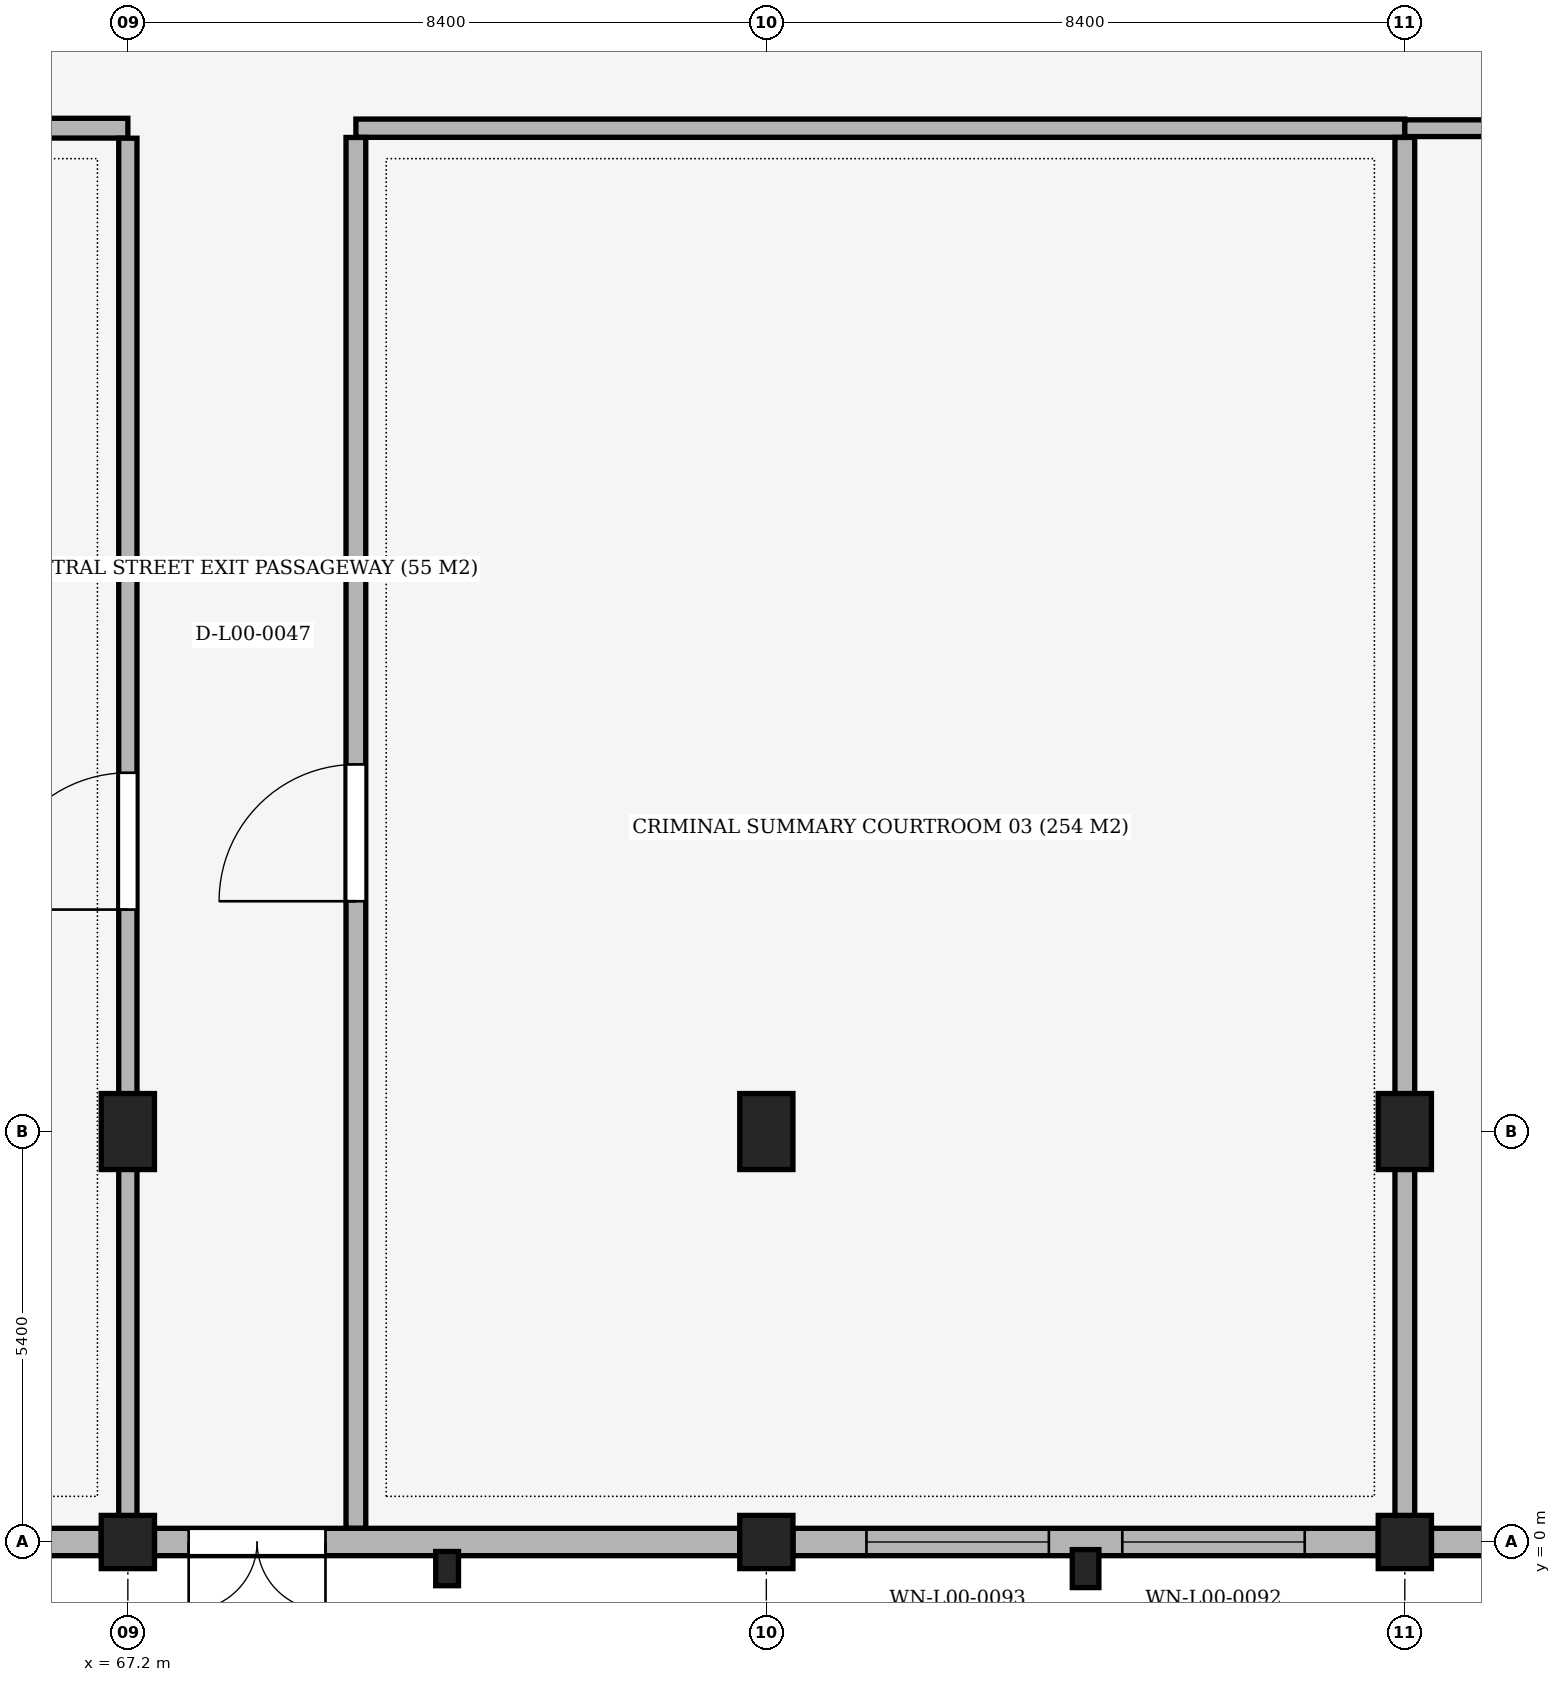
"""IFC4 building model, lengths in metres.
Left out: names, types, materials, properties, quantities, classifications, styles, units other than length and angle.
Written with IfcOpenShell. Run it as: python <this file> out.ifc"""

import sys

from ifc_helpers import new_model, si_unit, direction, frame, frame_2d, origin, origin_2d, place, context, subcontext, project, spatial, rectangle, extrude, element, fill, save


model = new_model("IFC4")
c1 = context("Model", 3, precision=1e-05, world=origin(), true_north=direction((0.0, 1.0)))
c2 = subcontext(c1, "Body", "Model", "MODEL_VIEW")
j1 = project(units=[si_unit("LENGTHUNIT", "METRE"), si_unit("PLANEANGLEUNIT", "RADIAN")], contexts=[c1])
p1 = place(None, origin())
s1 = spatial("IfcSite", under=j1, at=p1, CompositionType="ELEMENT")
p2 = place(p1, origin())
s2 = spatial("IfcBuilding", under=s1, at=p2, CompositionType="ELEMENT")
p3 = place(p2, origin())
s3 = spatial("IfcBuildingStorey", under=s2, at=p3, CompositionType="ELEMENT", Elevation=0.0)
p4 = place(p3, frame((67.2, 0.0, 0.0), z_axis=(0.0, 0.0, 1.0), x_axis=(1.0, 0.0, 0.0)))
e1 = element("IfcColumn", 1, at=p4, inside=s3, PredefinedType="COLUMN", context=c2, shape_type="SweptSolid", body=[
    extrude(rectangle(XDim=0.7, YDim=0.7, at=origin_2d()), origin(), (0.0, 0.0, 1.0), 5.1),
])
p5 = place(p3, frame((67.2, 5.4, 0.0), z_axis=(0.0, 0.0, 1.0), x_axis=(1.0, 0.0, 0.0)))
e2 = element("IfcColumn", 2, at=p5, inside=s3, PredefinedType="COLUMN", context=c2, shape_type="SweptSolid", body=[
    extrude(rectangle(XDim=0.7, YDim=1.0, at=origin_2d()), origin(), (0.0, 0.0, 1.0), 5.1),
])
p6 = place(p3, frame((75.6, 0.0, 0.0), z_axis=(0.0, 0.0, 1.0), x_axis=(1.0, 0.0, 0.0)))
e3 = element("IfcColumn", 3, at=p6, inside=s3, PredefinedType="COLUMN", context=c2, shape_type="SweptSolid", body=[
    extrude(rectangle(XDim=0.7, YDim=0.7, at=origin_2d()), origin(), (0.0, 0.0, 1.0), 5.1),
])
p7 = place(p3, frame((75.6, 5.4, 0.0), z_axis=(0.0, 0.0, 1.0), x_axis=(1.0, 0.0, 0.0)))
e4 = element("IfcColumn", 4, at=p7, inside=s3, PredefinedType="COLUMN", context=c2, shape_type="SweptSolid", body=[
    extrude(rectangle(XDim=0.7, YDim=1.0, at=origin_2d()), origin(), (0.0, 0.0, 1.0), 5.1),
])
p8 = place(p3, frame((84.0, 0.0, 0.0), z_axis=(0.0, 0.0, 1.0), x_axis=(1.0, 0.0, 0.0)))
e5 = element("IfcColumn", 5, at=p8, inside=s3, PredefinedType="COLUMN", context=c2, shape_type="SweptSolid", body=[
    extrude(rectangle(XDim=0.7, YDim=0.7, at=origin_2d()), origin(), (0.0, 0.0, 1.0), 5.1),
])
p9 = place(p3, frame((84.0, 5.4, 0.0), z_axis=(0.0, 0.0, 1.0), x_axis=(1.0, 0.0, 0.0)))
e6 = element("IfcColumn", 6, at=p9, inside=s3, PredefinedType="COLUMN", context=c2, shape_type="SweptSolid", body=[
    extrude(rectangle(XDim=0.7, YDim=1.0, at=origin_2d()), origin(), (0.0, 0.0, 1.0), 5.1),
])
p10 = place(p3, frame((71.4, -0.35, 0.0), z_axis=(0.0, 0.0, 1.0), x_axis=(1.0, 0.0, 0.0)))
e7 = element("IfcColumn", 7, at=p10, inside=s3, PredefinedType="PILASTER", context=c2, shape_type="SweptSolid", body=[
    extrude(rectangle(XDim=0.3, YDim=0.45, at=origin_2d()), origin(), (0.0, 0.0, 1.0), 5.1),
])
p11 = place(p3, frame((79.8, -0.35, 0.0), z_axis=(0.0, 0.0, 1.0), x_axis=(1.0, 0.0, 0.0)))
e8 = element("IfcColumn", 8, at=p11, inside=s3, PredefinedType="PILASTER", context=c2, shape_type="SweptSolid", body=[
    extrude(rectangle(XDim=0.35, YDim=0.5, at=origin_2d()), origin(), (0.0, 0.0, 1.0), 5.1),
])
p12 = place(p3, frame((92.05, 0.0, 0.0), z_axis=(0.0, 0.0, 1.0), x_axis=(-1.0, 0.0, 0.0)))
e9 = element("IfcWall", 9, at=p12, inside=s3, PredefinedType="SOLIDWALL", context=c2, shape_type="SweptSolid", body=[
    extrude(rectangle(XDim=7.7, YDim=0.36, at=frame_2d((3.85, 0.0))), origin(), (0.0, 0.0, 1.0), 4.07),
])
p13 = place(p12, frame((0.967, 0.0, 0.85)))
e10 = element("IfcOpeningElement", 10, at=p13, cuts=e9, PredefinedType="OPENING", context=c2, shape_type="SweptSolid", body=[
    extrude(rectangle(XDim=2.4, YDim=2.4, at=frame_2d((1.2, 1.2))), frame((0.0, 0.195, 0.0), z_axis=(0.0, -1.0, 0.0), x_axis=(1.0, 0.0, 0.0)), (0.0, 0.0, 1.0), 0.39),
])
p14 = place(p12, frame((4.333, 0.0, 0.85)))
e11 = element("IfcOpeningElement", 11, at=p14, cuts=e9, PredefinedType="OPENING", context=c2, shape_type="SweptSolid", body=[
    extrude(rectangle(XDim=2.4, YDim=2.4, at=frame_2d((1.2, 1.2))), frame((0.0, 0.195, 0.0), z_axis=(0.0, -1.0, 0.0), x_axis=(1.0, 0.0, 0.0)), (0.0, 0.0, 1.0), 0.39),
])
p15 = place(p3, frame((83.65, 0.0, 0.0), z_axis=(0.0, 0.0, 1.0), x_axis=(-1.0, 0.0, 0.0)))
e12 = element("IfcWall", 12, at=p15, inside=s3, PredefinedType="SOLIDWALL", context=c2, shape_type="SweptSolid", body=[
    extrude(rectangle(XDim=7.7, YDim=0.36, at=frame_2d((3.85, 0.0))), origin(), (0.0, 0.0, 1.0), 4.07),
])
p16 = place(p15, frame((0.967, 0.0, 0.85)))
e13 = element("IfcOpeningElement", 13, at=p16, cuts=e12, PredefinedType="OPENING", context=c2, shape_type="SweptSolid", body=[
    extrude(rectangle(XDim=2.4, YDim=2.4, at=frame_2d((1.2, 1.2))), frame((0.0, 0.195, 0.0), z_axis=(0.0, -1.0, 0.0), x_axis=(1.0, 0.0, 0.0)), (0.0, 0.0, 1.0), 0.39),
])
p17 = place(p15, frame((4.333, 0.0, 0.85)))
e14 = element("IfcOpeningElement", 14, at=p17, cuts=e12, PredefinedType="OPENING", context=c2, shape_type="SweptSolid", body=[
    extrude(rectangle(XDim=2.4, YDim=2.4, at=frame_2d((1.2, 1.2))), frame((0.0, 0.195, 0.0), z_axis=(0.0, -1.0, 0.0), x_axis=(1.0, 0.0, 0.0)), (0.0, 0.0, 1.0), 0.39),
])
p18 = place(p3, frame((75.25, 0.0, 0.0), z_axis=(0.0, 0.0, 1.0), x_axis=(-1.0, 0.0, 0.0)))
e15 = element("IfcWall", 15, at=p18, inside=s3, PredefinedType="SOLIDWALL", context=c2, shape_type="SweptSolid", body=[
    extrude(rectangle(XDim=7.7, YDim=0.36, at=frame_2d((3.85, 0.0))), origin(), (0.0, 0.0, 1.0), 4.07),
])
p19 = place(p18, frame((5.45, 0.0, 0.0)))
e16 = element("IfcOpeningElement", 16, at=p19, cuts=e15, PredefinedType="OPENING", context=c2, shape_type="SweptSolid", body=[
    extrude(rectangle(XDim=1.8, YDim=2.2, at=frame_2d((0.9, 1.1))), frame((0.0, 0.195, 0.0), z_axis=(0.0, -1.0, 0.0), x_axis=(1.0, 0.0, 0.0)), (0.0, 0.0, 1.0), 0.39),
])
p20 = place(p3, frame((66.85, 0.0, 0.0), z_axis=(0.0, 0.0, 1.0), x_axis=(-1.0, 0.0, 0.0)))
e17 = element("IfcWall", 17, at=p20, inside=s3, PredefinedType="SOLIDWALL", context=c2, shape_type="SweptSolid", body=[
    extrude(rectangle(XDim=7.7, YDim=0.36, at=frame_2d((3.85, 0.0))), origin(), (0.0, 0.0, 1.0), 4.07),
])
p21 = place(p20, frame((3.25, 0.0, 0.0)))
e18 = element("IfcOpeningElement", 18, at=p21, cuts=e17, PredefinedType="OPENING", context=c2, shape_type="SweptSolid", body=[
    extrude(rectangle(XDim=1.2, YDim=2.2, at=frame_2d((0.6, 1.1))), frame((0.0, 0.195, 0.0), z_axis=(0.0, -1.0, 0.0), x_axis=(1.0, 0.0, 0.0)), (0.0, 0.0, 1.0), 0.39),
])
p22 = place(p3, frame((50.4, 18.6, 0.0), z_axis=(0.0, 0.0, 1.0), x_axis=(1.0, 0.0, 0.0)))
e19 = element("IfcWall", 19, at=p22, inside=s3, PredefinedType="PARTITIONING", context=c2, shape_type="SweptSolid", body=[
    extrude(rectangle(XDim=16.8, YDim=0.26, at=frame_2d((8.4, 0.0))), origin(), (0.0, 0.0, 1.0), 3.67),
])
p23 = place(p3, frame((70.2, 18.6, 0.0), z_axis=(0.0, 0.0, 1.0), x_axis=(1.0, 0.0, 0.0)))
e20 = element("IfcWall", 20, at=p23, inside=s3, PredefinedType="PARTITIONING", context=c2, shape_type="SweptSolid", body=[
    extrude(rectangle(XDim=13.8, YDim=0.24, at=frame_2d((6.9, 0.0))), origin(), (0.0, 0.0, 1.0), 3.67),
])
p24 = place(p3, frame((84.0, 18.6, 0.0), z_axis=(0.0, 0.0, 1.0), x_axis=(1.0, 0.0, 0.0)))
e21 = element("IfcWall", 21, at=p24, inside=s3, PredefinedType="PARTITIONING", context=c2, shape_type="SweptSolid", body=[
    extrude(rectangle(XDim=24.8, YDim=0.22, at=frame_2d((12.4, 0.0))), origin(), (0.0, 0.0, 1.0), 3.67),
])
p25 = place(p24, frame((11.9, 0.0, 0.0)))
e22 = element("IfcOpeningElement", 22, at=p25, cuts=e21, PredefinedType="OPENING", context=c2, shape_type="SweptSolid", body=[
    extrude(rectangle(XDim=1.0, YDim=2.2, at=frame_2d((0.5, 1.1))), frame((0.0, 0.125, 0.0), z_axis=(0.0, -1.0, 0.0), x_axis=(1.0, 0.0, 0.0)), (0.0, 0.0, 1.0), 0.25),
])
p26 = place(p3, frame((67.2, -0.028, 0.0), z_axis=(0.0, 0.0, 1.0), x_axis=(0.0, 1.0, 0.0)))
e23 = element("IfcWall", 23, at=p26, inside=s3, PredefinedType="PARTITIONING", context=c2, shape_type="SweptSolid", body=[
    extrude(rectangle(XDim=18.496, YDim=0.24, at=frame_2d((9.248, 0.0))), origin(), (0.0, 0.0, 1.0), 3.67),
])
p27 = place(p26, frame((8.348, 0.0, 0.0)))
e24 = element("IfcOpeningElement", 24, at=p27, cuts=e23, PredefinedType="OPENING", context=c2, shape_type="SweptSolid", body=[
    extrude(rectangle(XDim=1.8, YDim=2.4, at=frame_2d((0.9, 1.2))), frame((0.0, 0.135, 0.0), z_axis=(0.0, -1.0, 0.0), x_axis=(1.0, 0.0, 0.0)), (0.0, 0.0, 1.0), 0.27),
])
p28 = place(p3, frame((70.2, 0.182, 0.0), z_axis=(0.0, 0.0, 1.0), x_axis=(0.0, 1.0, 0.0)))
e25 = element("IfcWall", 25, at=p28, inside=s3, PredefinedType="PARTITIONING", context=c2, shape_type="SweptSolid", body=[
    extrude(rectangle(XDim=18.296, YDim=0.26, at=frame_2d((9.148, 0.0))), origin(), (0.0, 0.0, 1.0), 4.07),
])
p29 = place(p28, frame((8.248, 0.0, 0.0)))
e26 = element("IfcOpeningElement", 26, at=p29, cuts=e25, PredefinedType="OPENING", context=c2, shape_type="SweptSolid", body=[
    extrude(rectangle(XDim=1.8, YDim=2.4, at=frame_2d((0.9, 1.2))), frame((0.0, 0.145, 0.0), z_axis=(0.0, -1.0, 0.0), x_axis=(1.0, 0.0, 0.0)), (0.0, 0.0, 1.0), 0.29),
])
p30 = place(p3, frame((84.0, -0.028, 0.0), z_axis=(0.0, 0.0, 1.0), x_axis=(0.0, 1.0, 0.0)))
e27 = element("IfcWall", 27, at=p30, inside=s3, PredefinedType="PARTITIONING", context=c2, shape_type="SweptSolid", body=[
    extrude(rectangle(XDim=18.506, YDim=0.26, at=frame_2d((9.253, 0.0))), origin(), (0.0, 0.0, 1.0), 3.67),
])
p31 = place(p16, origin())
e28 = element("IfcWindow", 28, at=p31, inside=s3, PartitioningType="SINGLE_PANEL", PredefinedType="WINDOW", context=c2, shape_type="SweptSolid", body=[
    extrude(rectangle(XDim=2.4, YDim=2.4, at=frame_2d((1.2, 1.2))), frame((0.0, 0.03, 0.0), z_axis=(0.0, -1.0, 0.0), x_axis=(1.0, 0.0, 0.0)), (0.0, 0.0, 1.0), 0.06),
])
fill(e13, e28)
p32 = place(p17, origin())
e29 = element("IfcWindow", 29, at=p32, inside=s3, PartitioningType="SINGLE_PANEL", PredefinedType="WINDOW", context=c2, shape_type="SweptSolid", body=[
    extrude(rectangle(XDim=2.4, YDim=2.4, at=frame_2d((1.2, 1.2))), frame((0.0, 0.03, 0.0), z_axis=(0.0, -1.0, 0.0), x_axis=(1.0, 0.0, 0.0)), (0.0, 0.0, 1.0), 0.06),
])
fill(e14, e29)
p33 = place(p19, origin())
e30 = element("IfcDoor", 30, at=p33, inside=s3, OperationType="DOUBLE_DOOR_SINGLE_SWING", PredefinedType="DOOR", context=c2, shape_type="SweptSolid", body=[
    extrude(rectangle(XDim=1.8, YDim=2.2, at=frame_2d((0.9, 1.1))), frame((0.0, 0.025, 0.0), z_axis=(0.0, -1.0, 0.0), x_axis=(1.0, 0.0, 0.0)), (0.0, 0.0, 1.0), 0.05),
])
fill(e16, e30)
p34 = place(p27, origin())
e31 = element("IfcDoor", 31, at=p34, inside=s3, OperationType="SINGLE_SWING_LEFT", PredefinedType="DOOR", context=c2, shape_type="SweptSolid", body=[
    extrude(rectangle(XDim=1.8, YDim=2.4, at=frame_2d((0.9, 1.2))), frame((0.0, 0.025, 0.0), z_axis=(0.0, -1.0, 0.0), x_axis=(1.0, 0.0, 0.0)), (0.0, 0.0, 1.0), 0.05),
])
fill(e24, e31)
p35 = place(p29, origin())
e32 = element("IfcDoor", 32, at=p35, inside=s3, OperationType="SINGLE_SWING_LEFT", PredefinedType="DOOR", context=c2, shape_type="SweptSolid", body=[
    extrude(rectangle(XDim=1.8, YDim=2.4, at=frame_2d((0.9, 1.2))), frame((0.0, 0.025, 0.0), z_axis=(0.0, -1.0, 0.0), x_axis=(1.0, 0.0, 0.0)), (0.0, 0.0, 1.0), 0.05),
])
fill(e26, e32)
save(model, sys.argv[1])
